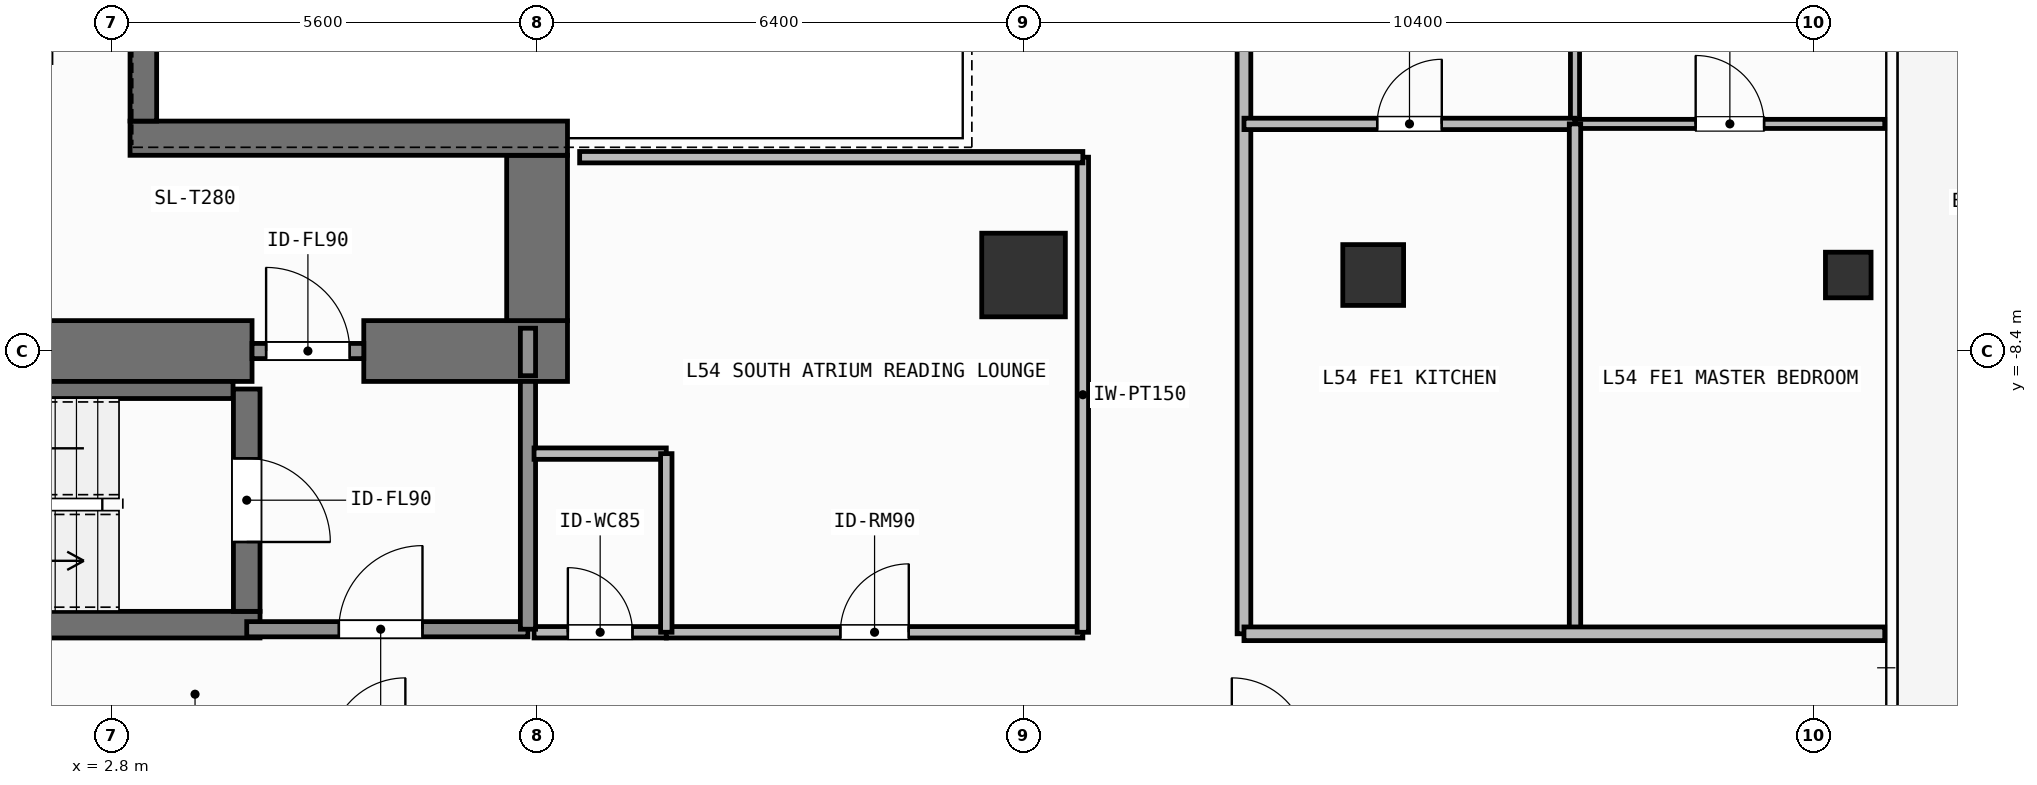
"""IFC4 building model, lengths in metres.
Left out: names, types, materials, properties, quantities, classifications, styles, units other than length and angle.
Written with IfcOpenShell. Run it as: python <this file> out.ifc"""

import sys

from ifc_helpers import new_model, si_unit, direction, frame, frame_2d, origin, origin_2d, place, context, subcontext, project, spatial, rectangle, hollow_rectangle, extrude, element, fill, save


model = new_model("IFC4")
c1 = context("Model", 3, precision=1e-05, world=origin(), true_north=direction((0.0, 1.0)))
c2 = subcontext(c1, "Body", "Model", "MODEL_VIEW")
j1 = project(units=[si_unit("LENGTHUNIT", "METRE"), si_unit("PLANEANGLEUNIT", "RADIAN")], contexts=[c1])
p1 = place(None, origin())
s1 = spatial("IfcSite", under=j1, at=p1, CompositionType="ELEMENT")
p2 = place(p1, origin())
s2 = spatial("IfcBuilding", under=s1, at=p2, CompositionType="ELEMENT")
p3 = place(p2, frame((0.0, 0.0, 219.6)))
s3 = spatial("IfcBuildingStorey", under=s2, at=p3, CompositionType="ELEMENT", Elevation=219.6)
p4 = place(p3, frame((-2.62, -8.4, 0.0), z_axis=(0.0, 0.0, 1.0), x_axis=(1.0, 0.0, 0.0)))
e1 = element("IfcWall", 1, at=p4, inside=s3, PredefinedType="SHEAR", context=c2, shape_type="SweptSolid", body=[
    extrude(rectangle(XDim=7.27, YDim=0.8, at=frame_2d((3.635, 0.0))), origin(), (0.0, 0.0, 1.0), 3.9),
])
p5 = place(p3, frame((6.12, -8.4, 0.0), z_axis=(0.0, 0.0, 1.0), x_axis=(1.0, 0.0, 0.0)))
e2 = element("IfcWall", 2, at=p5, inside=s3, PredefinedType="SHEAR", context=c2, shape_type="SweptSolid", body=[
    extrude(rectangle(XDim=2.68, YDim=0.8, at=frame_2d((1.34, 0.0))), origin(), (0.0, 0.0, 1.0), 3.9),
])
p6 = place(p3, frame((8.4, -8.0, 0.0), z_axis=(0.0, 0.0, 1.0), x_axis=(0.0, 1.0, 0.0)))
e3 = element("IfcWall", 3, at=p6, inside=s3, PredefinedType="SHEAR", context=c2, shape_type="SweptSolid", body=[
    extrude(rectangle(XDim=2.175, YDim=0.8, at=frame_2d((1.087, 0.0))), origin(), (0.0, 0.0, 1.0), 3.9),
])
p7 = place(p3, frame((3.045, -5.6, 0.0), z_axis=(0.0, 0.0, 1.0), x_axis=(1.0, 0.0, 0.0)))
e4 = element("IfcWall", 4, at=p7, inside=s3, PredefinedType="SHEAR", context=c2, shape_type="SweptSolid", body=[
    extrude(rectangle(XDim=5.755, YDim=0.45, at=frame_2d((2.877, 0.0))), origin(), (0.0, 0.0, 1.0), 3.9),
])
p8 = place(p3, frame((3.22, -5.375, 0.0), z_axis=(0.0, 0.0, 1.0), x_axis=(0.0, 1.0, 0.0)))
e5 = element("IfcWall", 5, at=p8, inside=s3, PredefinedType="SHEAR", context=c2, shape_type="SweptSolid", body=[
    extrude(rectangle(XDim=10.75, YDim=0.35, at=frame_2d((5.375, 0.0))), origin(), (0.0, 0.0, 1.0), 3.9),
])
p9 = place(p3, frame((-2.555, -12.0, 0.0), z_axis=(0.0, 0.0, 1.0), x_axis=(1.0, 0.0, 0.0)))
e6 = element("IfcWall", 6, at=p9, inside=s3, PredefinedType="SHEAR", context=c2, shape_type="SweptSolid", body=[
    extrude(rectangle(XDim=7.31, YDim=0.35, at=frame_2d((3.655, 0.0))), origin(), (0.0, 0.0, 1.0), 3.9),
])
p10 = place(p3, frame((-2.2, -8.913, 0.0), z_axis=(0.0, 0.0, 1.0), x_axis=(1.0, 0.0, 0.0)))
e7 = element("IfcWall", 7, at=p10, inside=s3, PredefinedType="SHEAR", context=c2, shape_type="SweptSolid", body=[
    extrude(rectangle(XDim=6.6, YDim=0.225, at=frame_2d((3.3, 0.0))), origin(), (0.0, 0.0, 1.0), 3.9),
])
p11 = place(p3, frame((4.58, -8.9, 0.0), z_axis=(0.0, 0.0, 1.0), x_axis=(0.0, -1.0, 0.0)))
e8 = element("IfcWall", 8, at=p11, inside=s3, PredefinedType="SHEAR", context=c2, shape_type="SweptSolid", body=[
    extrude(rectangle(XDim=2.925, YDim=0.35, at=frame_2d((1.462, 0.0))), origin(), (0.0, 0.0, 1.0), 3.9),
])
p12 = place(p11, frame((0.913, 0.0, 0.0)))
e9 = element("IfcOpeningElement", 9, at=p12, cuts=e8, PredefinedType="OPENING", context=c2, shape_type="SweptSolid", body=[
    extrude(rectangle(XDim=1.1, YDim=2.15, at=frame_2d((0.55, 1.075))), frame((0.0, 0.185, 0.0), z_axis=(0.0, -1.0, 0.0), x_axis=(1.0, 0.0, 0.0)), (0.0, 0.0, 1.0), 0.37),
])
p13 = place(p3, frame((14.8, -7.4, 0.0), z_axis=(0.0, 0.0, 1.0), x_axis=(1.0, 0.0, 0.0)))
e10 = element("IfcColumn", 10, at=p13, inside=s3, PredefinedType="COLUMN", context=c2, shape_type="SweptSolid", body=[
    extrude(rectangle(XDim=1.1, YDim=1.1, at=origin_2d()), origin(), (0.0, 0.0, 1.0), 3.9),
])
p14 = place(p3, frame((19.4, -7.4, 0.0), z_axis=(0.0, 0.0, 1.0), x_axis=(1.0, 0.0, 0.0)))
e11 = element("IfcColumn", 11, at=p14, inside=s3, PredefinedType="COLUMN", context=c2, shape_type="SweptSolid", body=[
    extrude(hollow_rectangle(XDim=0.8, YDim=0.8, WallThickness=0.036, at=origin_2d()), origin(), (0.0, 0.0, 1.0), 3.9),
])
p15 = place(p3, frame((25.65, -7.4, 0.0), z_axis=(0.0, 0.0, 1.0), x_axis=(1.0, 0.0, 0.0)))
e12 = element("IfcColumn", 12, at=p15, inside=s3, PredefinedType="COLUMN", context=c2, shape_type="SweptSolid", body=[
    extrude(hollow_rectangle(XDim=0.6, YDim=0.6, WallThickness=0.028, at=origin_2d()), origin(), (0.0, 0.0, 1.0), 3.9),
])
p16 = place(p3, frame((4.58, -12.06, 0.0), z_axis=(0.0, 0.0, 1.0), x_axis=(1.0, 0.0, 0.0)))
e13 = element("IfcWall", 13, at=p16, inside=s3, PredefinedType="SOLIDWALL", context=c2, shape_type="SweptSolid", body=[
    extrude(rectangle(XDim=3.7, YDim=0.2, at=frame_2d((1.85, 0.0))), origin(), (0.0, 0.0, 1.0), 3.68),
])
p17 = place(p16, frame((1.212, 0.0, 0.0)))
e14 = element("IfcOpeningElement", 14, at=p17, cuts=e13, PredefinedType="OPENING", context=c2, shape_type="SweptSolid", body=[
    extrude(rectangle(XDim=1.1, YDim=2.15, at=frame_2d((0.55, 1.075))), frame((0.0, 0.11, 0.0), z_axis=(0.0, -1.0, 0.0), x_axis=(1.0, 0.0, 0.0)), (0.0, 0.0, 1.0), 0.22),
])
p18 = place(p3, frame((4.65, -8.4, 0.0), z_axis=(0.0, 0.0, 1.0), x_axis=(1.0, 0.0, 0.0)))
e15 = element("IfcWall", 15, at=p18, inside=s3, PredefinedType="SOLIDWALL", context=c2, shape_type="SweptSolid", body=[
    extrude(rectangle(XDim=1.47, YDim=0.2, at=frame_2d((0.735, 0.0))), origin(), (0.0, 0.0, 1.0), 2.82),
])
p19 = place(p18, frame((0.185, 0.0, 0.0)))
e16 = element("IfcOpeningElement", 16, at=p19, cuts=e15, PredefinedType="OPENING", context=c2, shape_type="SweptSolid", body=[
    extrude(rectangle(XDim=1.1, YDim=2.15, at=frame_2d((0.55, 1.075))), frame((0.0, 0.11, 0.0), z_axis=(0.0, -1.0, 0.0), x_axis=(1.0, 0.0, 0.0)), (0.0, 0.0, 1.0), 0.22),
])
p20 = place(p3, frame((8.36, -12.1, 0.0), z_axis=(0.0, 0.0, 1.0), x_axis=(1.0, 0.0, 0.0)))
e17 = element("IfcWall", 17, at=p20, inside=s3, PredefinedType="PARTITIONING", context=c2, shape_type="SweptSolid", body=[
    extrude(rectangle(XDim=1.74, YDim=0.15, at=frame_2d((0.87, 0.0))), origin(), (0.0, 0.0, 1.0), 3.68),
])
p21 = place(p20, frame((0.445, 0.0, 0.0)))
e18 = element("IfcOpeningElement", 18, at=p21, cuts=e17, PredefinedType="OPENING", context=c2, shape_type="SweptSolid", body=[
    extrude(rectangle(XDim=0.85, YDim=2.1, at=frame_2d((0.425, 1.05))), frame((0.0, 0.085, 0.0), z_axis=(0.0, -1.0, 0.0), x_axis=(1.0, 0.0, 0.0)), (0.0, 0.0, 1.0), 0.17),
])
p22 = place(p3, frame((10.1, -12.1, 0.0), z_axis=(0.0, 0.0, 1.0), x_axis=(1.0, 0.0, 0.0)))
e19 = element("IfcWall", 19, at=p22, inside=s3, PredefinedType="PARTITIONING", context=c2, shape_type="SweptSolid", body=[
    extrude(rectangle(XDim=5.48, YDim=0.15, at=frame_2d((2.74, 0.0))), origin(), (0.0, 0.0, 1.0), 3.68),
])
p23 = place(p22, frame((2.29, 0.0, 0.0)))
e20 = element("IfcOpeningElement", 20, at=p23, cuts=e19, PredefinedType="OPENING", context=c2, shape_type="SweptSolid", body=[
    extrude(rectangle(XDim=0.9, YDim=2.1, at=frame_2d((0.45, 1.05))), frame((0.0, 0.085, 0.0), z_axis=(0.0, -1.0, 0.0), x_axis=(1.0, 0.0, 0.0)), (0.0, 0.0, 1.0), 0.17),
])
p24 = place(p3, frame((17.7, -12.12, 0.0), z_axis=(0.0, 0.0, 1.0), x_axis=(0.0, 1.0, 0.0)))
e21 = element("IfcWall", 21, at=p24, inside=s3, PredefinedType="PARTITIONING", context=c2, shape_type="SweptSolid", body=[
    extrude(rectangle(XDim=23.55, YDim=0.18, at=frame_2d((11.775, 0.0))), origin(), (0.0, 0.0, 1.0), 3.68),
])
p25 = place(p24, frame((11.454, 0.0, 0.0)))
e22 = element("IfcOpeningElement", 22, at=p25, cuts=e21, PredefinedType="OPENING", context=c2, shape_type="SweptSolid", body=[
    extrude(rectangle(XDim=1.0, YDim=2.2, at=frame_2d((0.5, 1.1))), frame((0.0, 0.1, 0.0), z_axis=(0.0, -1.0, 0.0), x_axis=(1.0, 0.0, 0.0)), (0.0, 0.0, 1.0), 0.2),
])
p26 = place(p3, frame((22.055, -5.412, 0.0), z_axis=(0.0, 0.0, 1.0), x_axis=(0.0, 1.0, 0.0)))
e23 = element("IfcWall", 23, at=p26, inside=s3, PredefinedType="PARTITIONING", context=c2, shape_type="SweptSolid", body=[
    extrude(rectangle(XDim=10.694, YDim=0.12, at=frame_2d((5.347, 0.0))), origin(), (0.0, 0.0, 1.0), 3.68),
])
p27 = place(p26, frame((4.808, 0.0, 0.0)))
e24 = element("IfcOpeningElement", 24, at=p27, cuts=e23, PredefinedType="OPENING", context=c2, shape_type="SweptSolid", body=[
    extrude(rectangle(XDim=0.9, YDim=2.1, at=frame_2d((0.45, 1.05))), frame((0.0, 0.07, 0.0), z_axis=(0.0, -1.0, 0.0), x_axis=(1.0, 0.0, 0.0)), (0.0, 0.0, 1.0), 0.14),
])
p28 = place(p3, frame((17.7, -5.412, 0.0), z_axis=(0.0, 0.0, 1.0), x_axis=(1.0, 0.0, 0.0)))
e25 = element("IfcWall", 25, at=p28, inside=s3, PredefinedType="PARTITIONING", context=c2, shape_type="SweptSolid", body=[
    extrude(rectangle(XDim=4.355, YDim=0.15, at=frame_2d((2.177, 0.0))), origin(), (0.0, 0.0, 1.0), 3.68),
])
p29 = place(p28, frame((1.752, 0.0, 0.0)))
e26 = element("IfcOpeningElement", 26, at=p29, cuts=e25, PredefinedType="OPENING", context=c2, shape_type="SweptSolid", body=[
    extrude(rectangle(XDim=0.85, YDim=2.1, at=frame_2d((0.425, 1.05))), frame((0.0, 0.085, 0.0), z_axis=(0.0, -1.0, 0.0), x_axis=(1.0, 0.0, 0.0)), (0.0, 0.0, 1.0), 0.17),
])
p30 = place(p3, frame((22.055, -5.412, 0.0), z_axis=(0.0, 0.0, 1.0), x_axis=(1.0, 0.0, 0.0)))
e27 = element("IfcWall", 27, at=p30, inside=s3, PredefinedType="PARTITIONING", context=c2, shape_type="SweptSolid", body=[
    extrude(rectangle(XDim=4.075, YDim=0.12, at=frame_2d((2.038, 0.0))), origin(), (0.0, 0.0, 1.0), 3.68),
])
p31 = place(p30, frame((1.587, 0.0, 0.0)))
e28 = element("IfcOpeningElement", 28, at=p31, cuts=e27, PredefinedType="OPENING", context=c2, shape_type="SweptSolid", body=[
    extrude(rectangle(XDim=0.9, YDim=2.1, at=frame_2d((0.45, 1.05))), frame((0.0, 0.07, 0.0), z_axis=(0.0, -1.0, 0.0), x_axis=(1.0, 0.0, 0.0)), (0.0, 0.0, 1.0), 0.14),
])
p32 = place(p3, frame((8.28, -12.06, 0.0), z_axis=(0.0, 0.0, 1.0), x_axis=(0.0, 1.0, 0.0)))
e29 = element("IfcWall", 29, at=p32, inside=s3, PredefinedType="SOLIDWALL", context=c2, shape_type="SweptSolid", body=[
    extrude(rectangle(XDim=3.26, YDim=0.2, at=frame_2d((1.63, 0.0))), origin(), (0.0, 0.0, 1.0), 3.68),
])
p33 = place(p3, frame((8.28, -8.725, 0.0), z_axis=(0.0, 0.0, 1.0), x_axis=(0.0, 1.0, 0.0)))
e30 = element("IfcWall", 30, at=p33, inside=s3, PredefinedType="SOLIDWALL", context=c2, shape_type="SweptSolid", body=[
    extrude(rectangle(XDim=0.625, YDim=0.2, at=frame_2d((0.312, 0.0))), origin(), (0.0, 0.0, 1.0), 3.68),
])
p34 = place(p3, frame((8.36, -9.75, 0.0), z_axis=(0.0, 0.0, 1.0), x_axis=(1.0, 0.0, 0.0)))
e31 = element("IfcWall", 31, at=p34, inside=s3, PredefinedType="PARTITIONING", context=c2, shape_type="SweptSolid", body=[
    extrude(rectangle(XDim=1.74, YDim=0.15, at=frame_2d((0.87, 0.0))), origin(), (0.0, 0.0, 1.0), 3.68),
])
p35 = place(p3, frame((10.1, -12.1, 0.0), z_axis=(0.0, 0.0, 1.0), x_axis=(0.0, 1.0, 0.0)))
e32 = element("IfcWall", 32, at=p35, inside=s3, PredefinedType="PARTITIONING", context=c2, shape_type="SweptSolid", body=[
    extrude(rectangle(XDim=2.35, YDim=0.15, at=frame_2d((1.175, 0.0))), origin(), (0.0, 0.0, 1.0), 3.68),
])
p36 = place(p3, frame((15.58, -12.1, 0.0), z_axis=(0.0, 0.0, 1.0), x_axis=(0.0, 1.0, 0.0)))
e33 = element("IfcWall", 33, at=p36, inside=s3, PredefinedType="PARTITIONING", context=c2, shape_type="SweptSolid", body=[
    extrude(rectangle(XDim=6.25, YDim=0.15, at=frame_2d((3.125, 0.0))), origin(), (0.0, 0.0, 1.0), 3.68),
])
p37 = place(p3, frame((8.96, -5.85, 0.0), z_axis=(0.0, 0.0, 1.0), x_axis=(1.0, 0.0, 0.0)))
e34 = element("IfcWall", 34, at=p37, inside=s3, PredefinedType="PARTITIONING", context=c2, shape_type="SweptSolid", body=[
    extrude(rectangle(XDim=6.62, YDim=0.15, at=frame_2d((3.31, 0.0))), origin(), (0.0, 0.0, 1.0), 3.68),
])
p38 = place(p3, frame((22.055, -12.12, 0.0), z_axis=(0.0, 0.0, 1.0), x_axis=(0.0, 1.0, 0.0)))
e35 = element("IfcWall", 35, at=p38, inside=s3, PredefinedType="PARTITIONING", context=c2, shape_type="SweptSolid", body=[
    extrude(rectangle(XDim=6.708, YDim=0.15, at=frame_2d((3.354, 0.0))), origin(), (0.0, 0.0, 1.0), 3.68),
])
p39 = place(p3, frame((17.7, -12.12, 0.0), z_axis=(0.0, 0.0, 1.0), x_axis=(1.0, 0.0, 0.0)))
e36 = element("IfcWall", 36, at=p39, inside=s3, PredefinedType="PARTITIONING", context=c2, shape_type="SweptSolid", body=[
    extrude(rectangle(XDim=8.43, YDim=0.18, at=frame_2d((4.215, 0.0))), origin(), (0.0, 0.0, 1.0), 3.68),
])
p40 = place(p12, origin())
e37 = element("IfcDoor", 37, at=p40, inside=s3, OperationType="SINGLE_SWING_RIGHT", PredefinedType="DOOR", context=c2, shape_type="SweptSolid", body=[
    extrude(rectangle(XDim=1.1, YDim=2.15, at=frame_2d((0.55, 1.075))), frame((0.0, 0.025, 0.0), z_axis=(0.0, -1.0, 0.0), x_axis=(1.0, 0.0, 0.0)), (0.0, 0.0, 1.0), 0.05),
])
fill(e9, e37)
p41 = place(p17, origin())
e38 = element("IfcDoor", 38, at=p41, inside=s3, OperationType="SINGLE_SWING_RIGHT", PredefinedType="DOOR", context=c2, shape_type="SweptSolid", body=[
    extrude(rectangle(XDim=1.1, YDim=2.15, at=frame_2d((0.55, 1.075))), frame((0.0, 0.025, 0.0), z_axis=(0.0, -1.0, 0.0), x_axis=(1.0, 0.0, 0.0)), (0.0, 0.0, 1.0), 0.05),
])
fill(e14, e38)
p42 = place(p19, origin())
e39 = element("IfcDoor", 39, at=p42, inside=s3, OperationType="SINGLE_SWING_LEFT", PredefinedType="DOOR", context=c2, shape_type="SweptSolid", body=[
    extrude(rectangle(XDim=1.1, YDim=2.15, at=frame_2d((0.55, 1.075))), frame((0.0, 0.025, 0.0), z_axis=(0.0, -1.0, 0.0), x_axis=(1.0, 0.0, 0.0)), (0.0, 0.0, 1.0), 0.05),
])
fill(e16, e39)
p43 = place(p21, origin())
e40 = element("IfcDoor", 40, at=p43, inside=s3, OperationType="SINGLE_SWING_LEFT", PredefinedType="DOOR", context=c2, shape_type="SweptSolid", body=[
    extrude(rectangle(XDim=0.85, YDim=2.1, at=frame_2d((0.425, 1.05))), frame((0.0, 0.025, 0.0), z_axis=(0.0, -1.0, 0.0), x_axis=(1.0, 0.0, 0.0)), (0.0, 0.0, 1.0), 0.05),
])
fill(e18, e40)
p44 = place(p23, origin())
e41 = element("IfcDoor", 41, at=p44, inside=s3, OperationType="SINGLE_SWING_RIGHT", PredefinedType="DOOR", context=c2, shape_type="SweptSolid", body=[
    extrude(rectangle(XDim=0.9, YDim=2.1, at=frame_2d((0.45, 1.05))), frame((0.0, 0.025, 0.0), z_axis=(0.0, -1.0, 0.0), x_axis=(1.0, 0.0, 0.0)), (0.0, 0.0, 1.0), 0.05),
])
fill(e20, e41)
p45 = place(p29, origin())
e42 = element("IfcDoor", 42, at=p45, inside=s3, OperationType="SINGLE_SWING_RIGHT", PredefinedType="DOOR", context=c2, shape_type="SweptSolid", body=[
    extrude(rectangle(XDim=0.85, YDim=2.1, at=frame_2d((0.425, 1.05))), frame((0.0, 0.025, 0.0), z_axis=(0.0, -1.0, 0.0), x_axis=(1.0, 0.0, 0.0)), (0.0, 0.0, 1.0), 0.05),
])
fill(e26, e42)
p46 = place(p31, origin())
e43 = element("IfcDoor", 43, at=p46, inside=s3, OperationType="SINGLE_SWING_LEFT", PredefinedType="DOOR", context=c2, shape_type="SweptSolid", body=[
    extrude(rectangle(XDim=0.9, YDim=2.1, at=frame_2d((0.45, 1.05))), frame((0.0, 0.025, 0.0), z_axis=(0.0, -1.0, 0.0), x_axis=(1.0, 0.0, 0.0)), (0.0, 0.0, 1.0), 0.05),
])
fill(e28, e43)
save(model, sys.argv[1])
